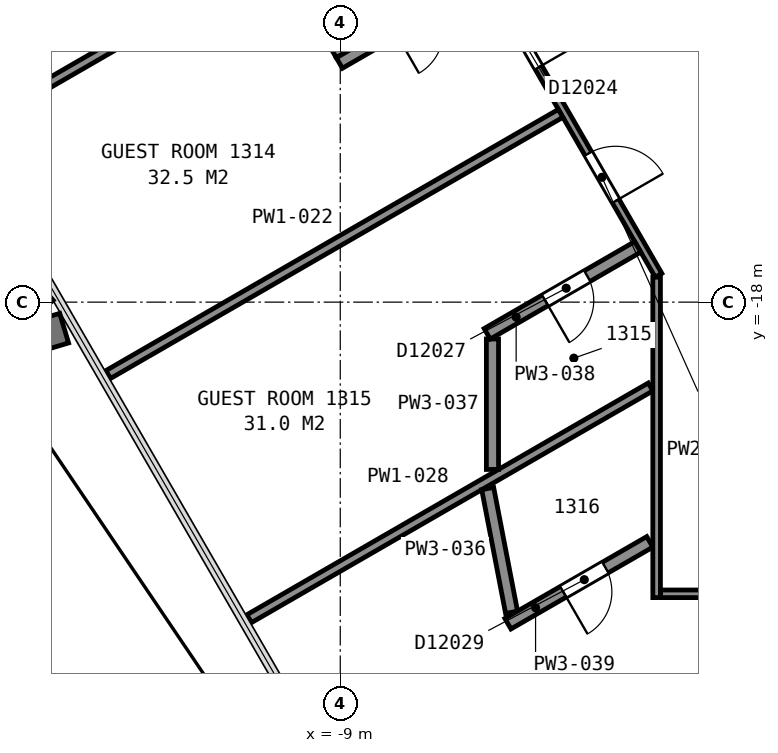
"""IFC4 building model, lengths in metres.
Left out: names, types, materials, properties, quantities, classifications, styles, units other than length and angle.
Written with IfcOpenShell. Run it as: python <this file> out.ifc"""

import sys

from ifc_helpers import new_model, si_unit, direction, frame, frame_2d, origin, origin_2d, place, context, subcontext, project, spatial, rectangle, i_section, extrude, element, fill, save


model = new_model("IFC4")
c1 = context("Model", 3, precision=1e-05, world=origin(), true_north=direction((0.0, 1.0)))
c2 = subcontext(c1, "Body", "Model", "MODEL_VIEW")
j1 = project(units=[si_unit("LENGTHUNIT", "METRE"), si_unit("PLANEANGLEUNIT", "RADIAN")], contexts=[c1])
p1 = place(None, origin())
s1 = spatial("IfcSite", under=j1, at=p1, CompositionType="ELEMENT")
p2 = place(p1, origin())
s2 = spatial("IfcBuilding", under=s1, at=p2, CompositionType="ELEMENT")
p3 = place(p2, frame((0.0, 0.0, 62.0)))
s3 = spatial("IfcBuildingStorey", under=s2, at=p3, CompositionType="ELEMENT", Elevation=62.0)
p4 = place(p3, frame((-13.992, -17.911, 0.025), z_axis=(-0.063660519168, -0.055368890729, 0.996434455566), x_axis=(-0.500027144747, 0.865858806591, 0.01616729924)))
e1 = element("IfcColumn", 1, at=p4, inside=s3, PredefinedType="COLUMN", context=c2, shape_type="SweptSolid", body=[
    extrude(i_section(OverallWidth=0.442, OverallDepth=0.531, WebThickness=0.066, FlangeThickness=0.106, FilletRadius=0.015, at=origin_2d()), origin(), (0.0, 0.0, 1.0), 3.563),
])
p5 = place(p3, frame((-13.664, 5.946, 0.0), z_axis=(0.0, 0.0, 1.0), x_axis=(0.499994327219, -0.866028678941, 0.0)))
e2 = element("IfcWall", 2, at=p5, inside=s3, PredefinedType="PARTITIONING", context=c2, shape_type="SweptSolid", body=[
    extrude(rectangle(XDim=23.968, YDim=0.2, at=frame_2d((11.984, 0.0))), origin(), (0.0, 0.0, 1.0), 3.35),
])
p6 = place(p3, frame((-15.135, -15.175, 0.0), z_axis=(0.0, 0.0, 1.0), x_axis=(0.866024224461, 0.500002042643, 0.0)))
e3 = element("IfcWall", 3, at=p6, inside=s3, PredefinedType="PARTITIONING", context=c2, shape_type="SweptSolid", body=[
    extrude(rectangle(XDim=8.592, YDim=0.15, at=frame_2d((4.296, 0.0))), origin(), (0.0, 0.0, 1.0), 2.613),
])
p7 = place(p3, frame((-3.766, -17.558, 0.0), z_axis=(0.0, 0.0, 1.0), x_axis=(-0.500008349927, 0.866020582898, 0.0)))
e4 = element("IfcWall", 4, at=p7, inside=s3, PredefinedType="PARTITIONING", context=c2, shape_type="SweptSolid", body=[
    extrude(rectangle(XDim=22.496, YDim=0.125, at=frame_2d((11.248, 0.0))), origin(), (0.0, 0.0, 1.0), 2.613),
])
p8 = place(p7, frame((20.563, 0.0, 0.0)))
e5 = element("IfcOpeningElement", 5, at=p8, cuts=e4, PredefinedType="OPENING", context=c2, shape_type="SweptSolid", body=[
    extrude(rectangle(XDim=0.9, YDim=2.1, at=frame_2d((0.45, 1.05))), frame((0.0, 0.073, 0.0), z_axis=(0.0, -1.0, 0.0), x_axis=(1.0, 0.0, 0.0)), (0.0, 0.0, 1.0), 0.145),
])
p9 = place(p7, frame((13.476, 0.0, 0.0)))
e6 = element("IfcOpeningElement", 6, at=p9, cuts=e4, PredefinedType="OPENING", context=c2, shape_type="SweptSolid", body=[
    extrude(rectangle(XDim=0.9, YDim=2.1, at=frame_2d((0.45, 1.05))), frame((0.0, 0.073, 0.0), z_axis=(0.0, -1.0, 0.0), x_axis=(1.0, 0.0, 0.0)), (0.0, 0.0, 1.0), 0.145),
])
p10 = place(p7, frame((10.684, 0.0, 0.0)))
e7 = element("IfcOpeningElement", 7, at=p10, cuts=e4, PredefinedType="OPENING", context=c2, shape_type="SweptSolid", body=[
    extrude(rectangle(XDim=0.9, YDim=2.1, at=frame_2d((0.45, 1.05))), frame((0.0, 0.073, 0.0), z_axis=(0.0, -1.0, 0.0), x_axis=(1.0, 0.0, 0.0)), (0.0, 0.0, 1.0), 0.145),
])
p11 = place(p7, frame((3.948, 0.0, 0.0)))
e8 = element("IfcOpeningElement", 8, at=p11, cuts=e4, PredefinedType="OPENING", context=c2, shape_type="SweptSolid", body=[
    extrude(rectangle(XDim=0.9, YDim=2.1, at=frame_2d((0.45, 1.05))), frame((0.0, 0.073, 0.0), z_axis=(0.0, -1.0, 0.0), x_axis=(1.0, 0.0, 0.0)), (0.0, 0.0, 1.0), 0.145),
])
p12 = place(p7, frame((1.411, 0.0, 0.0)))
e9 = element("IfcOpeningElement", 9, at=p12, cuts=e4, PredefinedType="OPENING", context=c2, shape_type="SweptSolid", body=[
    extrude(rectangle(XDim=0.9, YDim=2.1, at=frame_2d((0.45, 1.05))), frame((0.0, 0.073, 0.0), z_axis=(0.0, -1.0, 0.0), x_axis=(1.0, 0.0, 0.0)), (0.0, 0.0, 1.0), 0.145),
])
p13 = place(p3, frame((-12.816, -19.191, 0.0), z_axis=(0.0, 0.0, 1.0), x_axis=(0.866034625887, 0.499984026509, 0.0)))
e10 = element("IfcWall", 10, at=p13, inside=s3, PredefinedType="PARTITIONING", context=c2, shape_type="SweptSolid", body=[
    extrude(rectangle(XDim=8.591, YDim=0.15, at=frame_2d((4.295, 0.0))), origin(), (0.0, 0.0, 1.0), 2.613),
])
p14 = place(p3, frame((-10.498, -23.206, 0.0), z_axis=(0.0, 0.0, 1.0), x_axis=(0.866003165052, 0.500038516636, 0.0)))
e11 = element("IfcWall", 11, at=p14, inside=s3, PredefinedType="PARTITIONING", context=c2, shape_type="SweptSolid", body=[
    extrude(rectangle(XDim=7.623, YDim=0.15, at=frame_2d((3.811, 0.0))), origin(), (0.0, 0.0, 1.0), 2.613),
])
p15 = place(p3, frame((-9.938, -12.268, 0.0), z_axis=(0.0, 0.0, 1.0), x_axis=(0.500269123289, -0.865869969617, 0.0)))
e12 = element("IfcWall", 12, at=p15, inside=s3, PredefinedType="PARTITIONING", context=c2, shape_type="SweptSolid", body=[
    extrude(rectangle(XDim=1.92, YDim=0.2, at=frame_2d((0.96, 0.0))), origin(), (0.0, 0.0, 1.0), 2.613),
])
p16 = place(p3, frame((-9.015, -14.067, 0.0), z_axis=(0.0, 0.0, 1.0), x_axis=(0.866028150195, 0.499995243048, 0.0)))
e13 = element("IfcWall", 13, at=p16, inside=s3, PredefinedType="PARTITIONING", context=c2, shape_type="SweptSolid", body=[
    extrude(rectangle(XDim=2.737, YDim=0.2, at=frame_2d((1.369, 0.0))), origin(), (0.0, 0.0, 1.0), 2.613),
])
p17 = place(p16, frame((1.05, 0.0, 0.0)))
e14 = element("IfcOpeningElement", 14, at=p17, cuts=e13, PredefinedType="OPENING", context=c2, shape_type="SweptSolid", body=[
    extrude(rectangle(XDim=0.8, YDim=2.1, at=frame_2d((0.4, 1.05))), frame((0.0, 0.11, 0.0), z_axis=(0.0, -1.0, 0.0), x_axis=(1.0, 0.0, 0.0)), (0.0, 0.0, 1.0), 0.22),
])
p18 = place(p3, frame((-6.575, -21.066, 0.0), z_axis=(0.0, 0.0, 1.0), x_axis=(0.189476305735, -0.981885293486, 0.0)))
e15 = element("IfcWall", 15, at=p18, inside=s3, PredefinedType="PARTITIONING", context=c2, shape_type="SweptSolid", body=[
    extrude(rectangle(XDim=2.073, YDim=0.2, at=frame_2d((1.037, 0.0))), origin(), (0.0, 0.0, 1.0), 2.613),
])
p19 = place(p3, frame((-6.497, -20.752, 0.0), z_axis=(0.0, 0.0, 1.0), x_axis=(0.0, 1.0, 0.0)))
e16 = element("IfcWall", 16, at=p19, inside=s3, PredefinedType="PARTITIONING", context=c2, shape_type="SweptSolid", body=[
    extrude(rectangle(XDim=2.146, YDim=0.2, at=frame_2d((1.073, 0.0))), origin(), (0.0, 0.0, 1.0), 2.613),
])
p20 = place(p3, frame((-4.108, -17.091, 0.0), z_axis=(0.0, 0.0, 1.0), x_axis=(-0.865942343511, -0.500143837025, 0.0)))
e17 = element("IfcWall", 17, at=p20, inside=s3, PredefinedType="PARTITIONING", context=c2, shape_type="SweptSolid", body=[
    extrude(rectangle(XDim=2.859, YDim=0.2, at=frame_2d((1.429, 0.0))), origin(), (0.0, 0.0, 1.0), 2.613),
])
p21 = place(p20, frame((0.959, 0.0, 0.0)))
e18 = element("IfcOpeningElement", 18, at=p21, cuts=e17, PredefinedType="OPENING", context=c2, shape_type="SweptSolid", body=[
    extrude(rectangle(XDim=0.8, YDim=2.1, at=frame_2d((0.4, 1.05))), frame((0.0, 0.11, 0.0), z_axis=(0.0, -1.0, 0.0), x_axis=(1.0, 0.0, 0.0)), (0.0, 0.0, 1.0), 0.22),
])
p22 = place(p3, frame((-6.243, -23.289, 0.0), z_axis=(0.0, 0.0, 1.0), x_axis=(0.866172005986, 0.499745991525, 0.0)))
e19 = element("IfcWall", 19, at=p22, inside=s3, PredefinedType="PARTITIONING", context=c2, shape_type="SweptSolid", body=[
    extrude(rectangle(XDim=2.694, YDim=0.2, at=frame_2d((1.347, 0.0))), origin(), (0.0, 0.0, 1.0), 2.613),
])
p23 = place(p22, frame((1.05, 0.0, 0.0)))
e20 = element("IfcOpeningElement", 20, at=p23, cuts=e19, PredefinedType="OPENING", context=c2, shape_type="SweptSolid", body=[
    extrude(rectangle(XDim=0.8, YDim=2.1, at=frame_2d((0.4, 1.05))), frame((0.0, 0.11, 0.0), z_axis=(0.0, -1.0, 0.0), x_axis=(1.0, 0.0, 0.0)), (0.0, 0.0, 1.0), 0.22),
])
p24 = place(p3, frame((-3.797, -22.86, 0.0), z_axis=(0.0, 0.0, 1.0), x_axis=(0.0, 1.0, 0.0)))
e21 = element("IfcWall", 21, at=p24, inside=s3, PredefinedType="PARTITIONING", context=c2, shape_type="SweptSolid", body=[
    extrude(rectangle(XDim=5.271, YDim=0.125, at=frame_2d((2.635, 0.0))), origin(), (0.0, 0.0, 1.0), 2.613),
])
p25 = place(p3, frame((-3.732, -22.797, 0.0), z_axis=(0.0, 0.0, 1.0), x_axis=(1.0, 0.0, 0.0)))
e22 = element("IfcWall", 22, at=p25, inside=s3, PredefinedType="PARTITIONING", context=c2, shape_type="SweptSolid", body=[
    extrude(rectangle(XDim=3.053, YDim=0.125, at=frame_2d((1.527, 0.0))), origin(), (0.0, 0.0, 1.0), 2.613),
])
p26 = place(p11, origin())
e23 = element("IfcDoor", 23, at=p26, inside=s3, OperationType="SINGLE_SWING_LEFT", PredefinedType="DOOR", context=c2, shape_type="SweptSolid", body=[
    extrude(rectangle(XDim=0.9, YDim=2.1, at=frame_2d((0.45, 1.05))), frame((0.0, 0.025, 0.0), z_axis=(0.0, -1.0, 0.0), x_axis=(1.0, 0.0, 0.0)), (0.0, 0.0, 1.0), 0.05),
])
fill(e8, e23)
p27 = place(p12, origin())
e24 = element("IfcDoor", 24, at=p27, inside=s3, OperationType="SINGLE_SWING_LEFT", PredefinedType="DOOR", context=c2, shape_type="SweptSolid", body=[
    extrude(rectangle(XDim=0.9, YDim=2.1, at=frame_2d((0.45, 1.05))), frame((0.0, 0.025, 0.0), z_axis=(0.0, -1.0, 0.0), x_axis=(1.0, 0.0, 0.0)), (0.0, 0.0, 1.0), 0.05),
])
fill(e9, e24)
p28 = place(p21, origin())
e25 = element("IfcDoor", 25, at=p28, inside=s3, OperationType="SINGLE_SWING_RIGHT", PredefinedType="DOOR", context=c2, shape_type="SweptSolid", body=[
    extrude(rectangle(XDim=0.8, YDim=2.1, at=frame_2d((0.4, 1.05))), frame((0.0, 0.025, 0.0), z_axis=(0.0, -1.0, 0.0), x_axis=(1.0, 0.0, 0.0)), (0.0, 0.0, 1.0), 0.05),
])
fill(e18, e25)
p29 = place(p23, origin())
e26 = element("IfcDoor", 26, at=p29, inside=s3, OperationType="SINGLE_SWING_LEFT", PredefinedType="DOOR", context=c2, shape_type="SweptSolid", body=[
    extrude(rectangle(XDim=0.8, YDim=2.1, at=frame_2d((0.4, 1.05))), frame((0.0, 0.025, 0.0), z_axis=(0.0, -1.0, 0.0), x_axis=(1.0, 0.0, 0.0)), (0.0, 0.0, 1.0), 0.05),
])
fill(e20, e26)
save(model, sys.argv[1])
